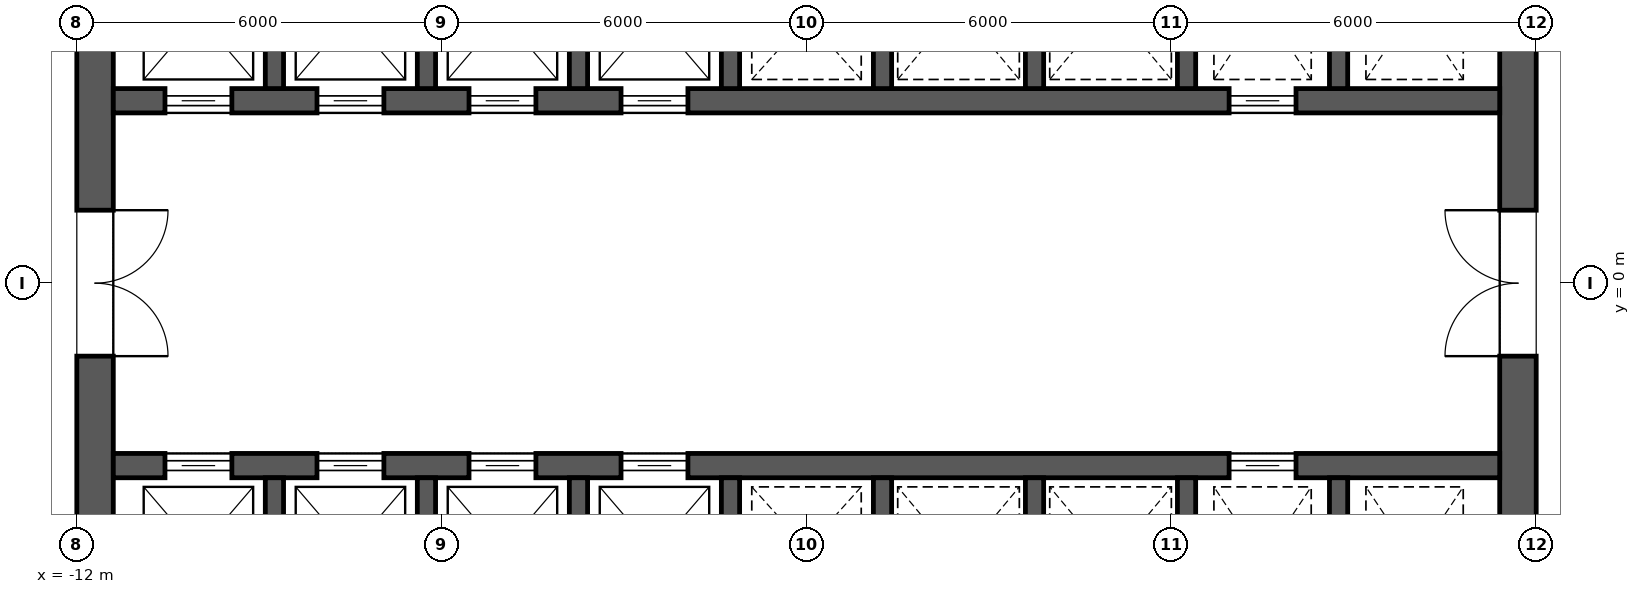
"""IFC4 building model, lengths in metres.
Left out: names, types, materials, properties, quantities, classifications, styles, units other than length and angle.
Written with IfcOpenShell. Run it as: python <this file> out.ifc"""

import sys

from ifc_helpers import new_model, si_unit, direction, frame, frame_2d, origin, place, context, subcontext, project, spatial, rectangle, extrude, element, fill, save


model = new_model("IFC4")
c1 = context("Model", 3, precision=1e-05, world=origin(), true_north=direction((0.0, 1.0)))
c2 = subcontext(c1, "Body", "Model", "MODEL_VIEW")
j1 = project(units=[si_unit("LENGTHUNIT", "METRE"), si_unit("PLANEANGLEUNIT", "RADIAN")], contexts=[c1])
p1 = place(None, origin())
s1 = spatial("IfcSite", under=j1, at=p1, CompositionType="ELEMENT")
p2 = place(p1, origin())
s2 = spatial("IfcBuilding", under=s1, at=p2, CompositionType="ELEMENT")
p3 = place(p2, frame((0.0, 0.0, 36.1)))
s3 = spatial("IfcBuildingStorey", under=s2, at=p3, CompositionType="ELEMENT", Elevation=36.1)
p4 = place(p3, frame((11.7, -11.4, 0.0), z_axis=(0.0, 0.0, 1.0), x_axis=(0.0, 1.0, 0.0)))
e1 = element("IfcWall", 1, at=p4, inside=s3, PredefinedType="SHEAR", context=c2, shape_type="SweptSolid", body=[
    extrude(rectangle(XDim=22.8, YDim=0.6, at=frame_2d((11.4, 0.0))), origin(), (0.0, 0.0, 1.0), 4.2),
])
p5 = place(p4, frame((10.2, 0.0, 0.0)))
e2 = element("IfcOpeningElement", 2, at=p5, cuts=e1, PredefinedType="OPENING", context=c2, shape_type="SweptSolid", body=[
    extrude(rectangle(XDim=2.4, YDim=2.1, at=frame_2d((1.2, 1.05))), frame((0.0, 0.312, 0.0), z_axis=(0.0, -1.0, 0.0), x_axis=(1.0, 0.0, 0.0)), (0.0, 0.0, 1.0), 0.624),
])
p6 = place(p4, frame((19.5, 0.0, 0.0)))
e3 = element("IfcOpeningElement", 3, at=p6, cuts=e1, PredefinedType="OPENING", context=c2, shape_type="SweptSolid", body=[
    extrude(rectangle(XDim=1.2, YDim=2.1, at=frame_2d((0.6, 1.05))), frame((0.0, 0.312, 0.0), z_axis=(0.0, -1.0, 0.0), x_axis=(1.0, 0.0, 0.0)), (0.0, 0.0, 1.0), 0.624),
])
p7 = place(p4, frame((2.1, 0.0, 0.0)))
e4 = element("IfcOpeningElement", 4, at=p7, cuts=e1, PredefinedType="OPENING", context=c2, shape_type="SweptSolid", body=[
    extrude(rectangle(XDim=1.2, YDim=2.1, at=frame_2d((0.6, 1.05))), frame((0.0, 0.312, 0.0), z_axis=(0.0, -1.0, 0.0), x_axis=(1.0, 0.0, 0.0)), (0.0, 0.0, 1.0), 0.624),
])
p8 = place(p3, frame((-11.7, -11.4, 0.0), z_axis=(0.0, 0.0, 1.0), x_axis=(0.0, 1.0, 0.0)))
e5 = element("IfcWall", 5, at=p8, inside=s3, PredefinedType="SHEAR", context=c2, shape_type="SweptSolid", body=[
    extrude(rectangle(XDim=22.8, YDim=0.6, at=frame_2d((11.4, 0.0))), origin(), (0.0, 0.0, 1.0), 4.2),
])
p9 = place(p8, frame((10.2, 0.0, 0.0)))
e6 = element("IfcOpeningElement", 6, at=p9, cuts=e5, PredefinedType="OPENING", context=c2, shape_type="SweptSolid", body=[
    extrude(rectangle(XDim=2.4, YDim=2.1, at=frame_2d((1.2, 1.05))), frame((0.0, 0.312, 0.0), z_axis=(0.0, -1.0, 0.0), x_axis=(1.0, 0.0, 0.0)), (0.0, 0.0, 1.0), 0.624),
])
p10 = place(p8, frame((18.925, 0.0, 0.0)))
e7 = element("IfcOpeningElement", 7, at=p10, cuts=e5, PredefinedType="OPENING", context=c2, shape_type="SweptSolid", body=[
    extrude(rectangle(XDim=1.2, YDim=2.1, at=frame_2d((0.6, 1.05))), frame((0.0, 0.312, 0.0), z_axis=(0.0, -1.0, 0.0), x_axis=(1.0, 0.0, 0.0)), (0.0, 0.0, 1.0), 0.624),
])
p11 = place(p8, frame((2.675, 0.0, 0.0)))
e8 = element("IfcOpeningElement", 8, at=p11, cuts=e5, PredefinedType="OPENING", context=c2, shape_type="SweptSolid", body=[
    extrude(rectangle(XDim=1.2, YDim=2.1, at=frame_2d((0.6, 1.05))), frame((0.0, 0.312, 0.0), z_axis=(0.0, -1.0, 0.0), x_axis=(1.0, 0.0, 0.0)), (0.0, 0.0, 1.0), 0.624),
])
p12 = place(p3, frame((-11.4, 3.0, 0.0), z_axis=(0.0, 0.0, 1.0), x_axis=(1.0, 0.0, 0.0)))
e9 = element("IfcWall", 9, at=p12, inside=s3, PredefinedType="SHEAR", context=c2, shape_type="SweptSolid", body=[
    extrude(rectangle(XDim=22.8, YDim=0.4, at=frame_2d((11.4, 0.0))), origin(), (0.0, 0.0, 1.0), 4.2),
])
p13 = place(p12, frame((0.85, 0.0, 0.0)))
e10 = element("IfcOpeningElement", 10, at=p13, cuts=e9, PredefinedType="OPENING", context=c2, shape_type="SweptSolid", body=[
    extrude(rectangle(XDim=1.1, YDim=2.1, at=frame_2d((0.55, 1.05))), frame((0.0, 0.212, 0.0), z_axis=(0.0, -1.0, 0.0), x_axis=(1.0, 0.0, 0.0)), (0.0, 0.0, 1.0), 0.424),
])
p14 = place(p12, frame((3.35, 0.0, 0.0)))
e11 = element("IfcOpeningElement", 11, at=p14, cuts=e9, PredefinedType="OPENING", context=c2, shape_type="SweptSolid", body=[
    extrude(rectangle(XDim=1.1, YDim=2.1, at=frame_2d((0.55, 1.05))), frame((0.0, 0.212, 0.0), z_axis=(0.0, -1.0, 0.0), x_axis=(1.0, 0.0, 0.0)), (0.0, 0.0, 1.0), 0.424),
])
p15 = place(p12, frame((5.85, 0.0, 0.0)))
e12 = element("IfcOpeningElement", 12, at=p15, cuts=e9, PredefinedType="OPENING", context=c2, shape_type="SweptSolid", body=[
    extrude(rectangle(XDim=1.1, YDim=2.1, at=frame_2d((0.55, 1.05))), frame((0.0, 0.212, 0.0), z_axis=(0.0, -1.0, 0.0), x_axis=(1.0, 0.0, 0.0)), (0.0, 0.0, 1.0), 0.424),
])
p16 = place(p12, frame((8.35, 0.0, 0.0)))
e13 = element("IfcOpeningElement", 13, at=p16, cuts=e9, PredefinedType="OPENING", context=c2, shape_type="SweptSolid", body=[
    extrude(rectangle(XDim=1.1, YDim=2.1, at=frame_2d((0.55, 1.05))), frame((0.0, 0.212, 0.0), z_axis=(0.0, -1.0, 0.0), x_axis=(1.0, 0.0, 0.0)), (0.0, 0.0, 1.0), 0.424),
])
p17 = place(p12, frame((18.35, 0.0, 0.0)))
e14 = element("IfcOpeningElement", 14, at=p17, cuts=e9, PredefinedType="OPENING", context=c2, shape_type="SweptSolid", body=[
    extrude(rectangle(XDim=1.1, YDim=2.1, at=frame_2d((0.55, 1.05))), frame((0.0, 0.212, 0.0), z_axis=(0.0, -1.0, 0.0), x_axis=(1.0, 0.0, 0.0)), (0.0, 0.0, 1.0), 0.424),
])
for number, where, z_axis, x_axis in (
    (15, (-8.75, 3.2, 0.0), (0.0, 0.0, 1.0), (0.0, 1.0, 0.0)),
    (16, (-6.25, 3.2, 0.0), (0.0, 0.0, 1.0), (0.0, 1.0, 0.0)),
    (17, (-3.75, 3.2, 0.0), (0.0, 0.0, 1.0), (0.0, 1.0, 0.0)),
    (18, (-1.25, 3.2, 0.0), (0.0, 0.0, 1.0), (0.0, 1.0, 0.0)),
    (19, (1.25, 3.2, 0.0), (0.0, 0.0, 1.0), (0.0, 1.0, 0.0)),
    (20, (3.75, 3.2, 0.0), (0.0, 0.0, 1.0), (0.0, 1.0, 0.0)),
    (21, (6.25, 3.2, 0.0), (0.0, 0.0, 1.0), (0.0, 1.0, 0.0)),
    (22, (8.75, 3.2, 0.0), (0.0, 0.0, 1.0), (0.0, 1.0, 0.0)),
):
    element("IfcWall", number, at=place(p3, frame(where, z_axis=z_axis, x_axis=x_axis)), inside=s3, PredefinedType="SHEAR", context=c2, shape_type="SweptSolid", body=[
        extrude(rectangle(XDim=2.9, YDim=0.3, at=frame_2d((1.45, 0.0))), origin(), (0.0, 0.0, 1.0), 4.2),
    ])
p18 = place(p3, frame((-11.4, -3.0, 0.0), z_axis=(0.0, 0.0, 1.0), x_axis=(1.0, 0.0, 0.0)))
e23 = element("IfcWall", 23, at=p18, inside=s3, PredefinedType="SHEAR", context=c2, shape_type="SweptSolid", body=[
    extrude(rectangle(XDim=22.8, YDim=0.4, at=frame_2d((11.4, 0.0))), origin(), (0.0, 0.0, 1.0), 4.2),
])
p19 = place(p18, frame((0.85, 0.0, 0.0)))
e24 = element("IfcOpeningElement", 24, at=p19, cuts=e23, PredefinedType="OPENING", context=c2, shape_type="SweptSolid", body=[
    extrude(rectangle(XDim=1.1, YDim=2.1, at=frame_2d((0.55, 1.05))), frame((0.0, 0.212, 0.0), z_axis=(0.0, -1.0, 0.0), x_axis=(1.0, 0.0, 0.0)), (0.0, 0.0, 1.0), 0.424),
])
p20 = place(p18, frame((3.35, 0.0, 0.0)))
e25 = element("IfcOpeningElement", 25, at=p20, cuts=e23, PredefinedType="OPENING", context=c2, shape_type="SweptSolid", body=[
    extrude(rectangle(XDim=1.1, YDim=2.1, at=frame_2d((0.55, 1.05))), frame((0.0, 0.212, 0.0), z_axis=(0.0, -1.0, 0.0), x_axis=(1.0, 0.0, 0.0)), (0.0, 0.0, 1.0), 0.424),
])
p21 = place(p18, frame((5.85, 0.0, 0.0)))
e26 = element("IfcOpeningElement", 26, at=p21, cuts=e23, PredefinedType="OPENING", context=c2, shape_type="SweptSolid", body=[
    extrude(rectangle(XDim=1.1, YDim=2.1, at=frame_2d((0.55, 1.05))), frame((0.0, 0.212, 0.0), z_axis=(0.0, -1.0, 0.0), x_axis=(1.0, 0.0, 0.0)), (0.0, 0.0, 1.0), 0.424),
])
p22 = place(p18, frame((8.35, 0.0, 0.0)))
e27 = element("IfcOpeningElement", 27, at=p22, cuts=e23, PredefinedType="OPENING", context=c2, shape_type="SweptSolid", body=[
    extrude(rectangle(XDim=1.1, YDim=2.1, at=frame_2d((0.55, 1.05))), frame((0.0, 0.212, 0.0), z_axis=(0.0, -1.0, 0.0), x_axis=(1.0, 0.0, 0.0)), (0.0, 0.0, 1.0), 0.424),
])
p23 = place(p18, frame((18.35, 0.0, 0.0)))
e28 = element("IfcOpeningElement", 28, at=p23, cuts=e23, PredefinedType="OPENING", context=c2, shape_type="SweptSolid", body=[
    extrude(rectangle(XDim=1.1, YDim=2.1, at=frame_2d((0.55, 1.05))), frame((0.0, 0.212, 0.0), z_axis=(0.0, -1.0, 0.0), x_axis=(1.0, 0.0, 0.0)), (0.0, 0.0, 1.0), 0.424),
])
for number, where, z_axis, x_axis in (
    (29, (-8.75, -6.1, 0.0), (0.0, 0.0, 1.0), (0.0, 1.0, 0.0)),
    (30, (-6.25, -6.1, 0.0), (0.0, 0.0, 1.0), (0.0, 1.0, 0.0)),
    (31, (-3.75, -6.1, 0.0), (0.0, 0.0, 1.0), (0.0, 1.0, 0.0)),
    (32, (-1.25, -6.1, 0.0), (0.0, 0.0, 1.0), (0.0, 1.0, 0.0)),
    (33, (1.25, -6.1, 0.0), (0.0, 0.0, 1.0), (0.0, 1.0, 0.0)),
    (34, (3.75, -6.1, 0.0), (0.0, 0.0, 1.0), (0.0, 1.0, 0.0)),
    (35, (6.25, -6.1, 0.0), (0.0, 0.0, 1.0), (0.0, 1.0, 0.0)),
    (36, (8.75, -6.1, 0.0), (0.0, 0.0, 1.0), (0.0, 1.0, 0.0)),
):
    element("IfcWall", number, at=place(p3, frame(where, z_axis=z_axis, x_axis=x_axis)), inside=s3, PredefinedType="SHEAR", context=c2, shape_type="SweptSolid", body=[
        extrude(rectangle(XDim=2.9, YDim=0.3, at=frame_2d((1.45, 0.0))), origin(), (0.0, 0.0, 1.0), 4.2),
    ])
p24 = place(p13, origin())
e37 = element("IfcDoor", 37, at=p24, inside=s3, OperationType="SLIDING_TO_LEFT", PredefinedType="DOOR", context=c2, shape_type="SweptSolid", body=[
    extrude(rectangle(XDim=1.1, YDim=2.1, at=frame_2d((0.55, 1.05))), frame((0.0, 0.025, 0.0), z_axis=(0.0, -1.0, 0.0), x_axis=(1.0, 0.0, 0.0)), (0.0, 0.0, 1.0), 0.05),
])
fill(e10, e37)
p25 = place(p14, origin())
e38 = element("IfcDoor", 38, at=p25, inside=s3, OperationType="SLIDING_TO_LEFT", PredefinedType="DOOR", context=c2, shape_type="SweptSolid", body=[
    extrude(rectangle(XDim=1.1, YDim=2.1, at=frame_2d((0.55, 1.05))), frame((0.0, 0.025, 0.0), z_axis=(0.0, -1.0, 0.0), x_axis=(1.0, 0.0, 0.0)), (0.0, 0.0, 1.0), 0.05),
])
fill(e11, e38)
p26 = place(p15, origin())
e39 = element("IfcDoor", 39, at=p26, inside=s3, OperationType="SLIDING_TO_LEFT", PredefinedType="DOOR", context=c2, shape_type="SweptSolid", body=[
    extrude(rectangle(XDim=1.1, YDim=2.1, at=frame_2d((0.55, 1.05))), frame((0.0, 0.025, 0.0), z_axis=(0.0, -1.0, 0.0), x_axis=(1.0, 0.0, 0.0)), (0.0, 0.0, 1.0), 0.05),
])
fill(e12, e39)
p27 = place(p16, origin())
e40 = element("IfcDoor", 40, at=p27, inside=s3, OperationType="SLIDING_TO_LEFT", PredefinedType="DOOR", context=c2, shape_type="SweptSolid", body=[
    extrude(rectangle(XDim=1.1, YDim=2.1, at=frame_2d((0.55, 1.05))), frame((0.0, 0.025, 0.0), z_axis=(0.0, -1.0, 0.0), x_axis=(1.0, 0.0, 0.0)), (0.0, 0.0, 1.0), 0.05),
])
fill(e13, e40)
p28 = place(p19, origin())
e41 = element("IfcDoor", 41, at=p28, inside=s3, OperationType="SLIDING_TO_LEFT", PredefinedType="DOOR", context=c2, shape_type="SweptSolid", body=[
    extrude(rectangle(XDim=1.1, YDim=2.1, at=frame_2d((0.55, 1.05))), frame((0.0, 0.025, 0.0), z_axis=(0.0, -1.0, 0.0), x_axis=(1.0, 0.0, 0.0)), (0.0, 0.0, 1.0), 0.05),
])
fill(e24, e41)
p29 = place(p20, origin())
e42 = element("IfcDoor", 42, at=p29, inside=s3, OperationType="SLIDING_TO_LEFT", PredefinedType="DOOR", context=c2, shape_type="SweptSolid", body=[
    extrude(rectangle(XDim=1.1, YDim=2.1, at=frame_2d((0.55, 1.05))), frame((0.0, 0.025, 0.0), z_axis=(0.0, -1.0, 0.0), x_axis=(1.0, 0.0, 0.0)), (0.0, 0.0, 1.0), 0.05),
])
fill(e25, e42)
p30 = place(p21, origin())
e43 = element("IfcDoor", 43, at=p30, inside=s3, OperationType="SLIDING_TO_LEFT", PredefinedType="DOOR", context=c2, shape_type="SweptSolid", body=[
    extrude(rectangle(XDim=1.1, YDim=2.1, at=frame_2d((0.55, 1.05))), frame((0.0, 0.025, 0.0), z_axis=(0.0, -1.0, 0.0), x_axis=(1.0, 0.0, 0.0)), (0.0, 0.0, 1.0), 0.05),
])
fill(e26, e43)
p31 = place(p22, origin())
e44 = element("IfcDoor", 44, at=p31, inside=s3, OperationType="SLIDING_TO_LEFT", PredefinedType="DOOR", context=c2, shape_type="SweptSolid", body=[
    extrude(rectangle(XDim=1.1, YDim=2.1, at=frame_2d((0.55, 1.05))), frame((0.0, 0.025, 0.0), z_axis=(0.0, -1.0, 0.0), x_axis=(1.0, 0.0, 0.0)), (0.0, 0.0, 1.0), 0.05),
])
fill(e27, e44)
p32 = place(p17, origin())
e45 = element("IfcDoor", 45, at=p32, inside=s3, OperationType="SLIDING_TO_LEFT", PredefinedType="DOOR", context=c2, shape_type="SweptSolid", body=[
    extrude(rectangle(XDim=1.1, YDim=2.1, at=frame_2d((0.55, 1.05))), frame((0.0, 0.025, 0.0), z_axis=(0.0, -1.0, 0.0), x_axis=(1.0, 0.0, 0.0)), (0.0, 0.0, 1.0), 0.05),
])
fill(e14, e45)
p33 = place(p23, origin())
e46 = element("IfcDoor", 46, at=p33, inside=s3, OperationType="SLIDING_TO_LEFT", PredefinedType="DOOR", context=c2, shape_type="SweptSolid", body=[
    extrude(rectangle(XDim=1.1, YDim=2.1, at=frame_2d((0.55, 1.05))), frame((0.0, 0.025, 0.0), z_axis=(0.0, -1.0, 0.0), x_axis=(1.0, 0.0, 0.0)), (0.0, 0.0, 1.0), 0.05),
])
fill(e28, e46)
p34 = place(p9, frame((2.4, 0.0, 0.0), z_axis=(0.0, 0.0, 1.0), x_axis=(-1.0, 0.0, 0.0)))
e47 = element("IfcDoor", 47, at=p34, inside=s3, OperationType="DOUBLE_DOOR_SINGLE_SWING", PredefinedType="DOOR", context=c2, shape_type="SweptSolid", body=[
    extrude(rectangle(XDim=2.4, YDim=2.1, at=frame_2d((1.2, 1.05))), frame((0.0, 0.025, 0.0), z_axis=(0.0, -1.0, 0.0), x_axis=(1.0, 0.0, 0.0)), (0.0, 0.0, 1.0), 0.05),
])
fill(e6, e47)
p35 = place(p5, origin())
e48 = element("IfcDoor", 48, at=p35, inside=s3, OperationType="DOUBLE_DOOR_SINGLE_SWING", PredefinedType="DOOR", context=c2, shape_type="SweptSolid", body=[
    extrude(rectangle(XDim=2.4, YDim=2.1, at=frame_2d((1.2, 1.05))), frame((0.0, 0.025, 0.0), z_axis=(0.0, -1.0, 0.0), x_axis=(1.0, 0.0, 0.0)), (0.0, 0.0, 1.0), 0.05),
])
fill(e2, e48)
save(model, sys.argv[1])
